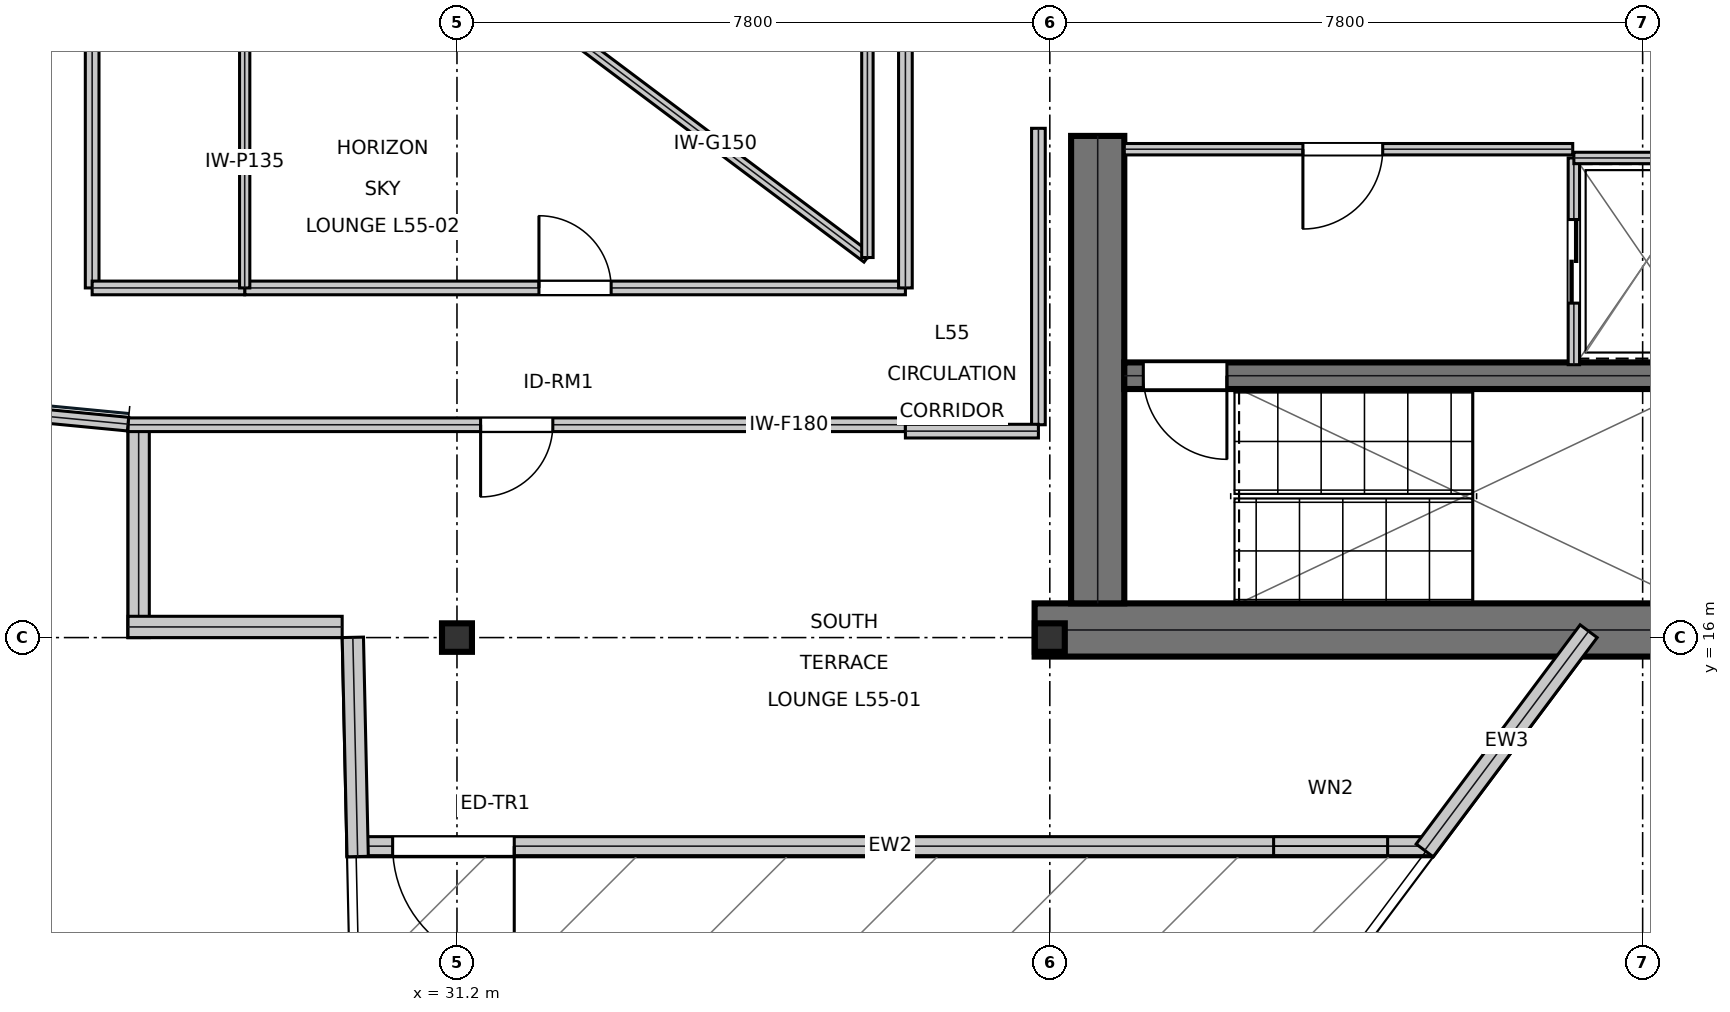
"""IFC4 building model, lengths in metres.
Left out: names, types, materials, properties, quantities, classifications, styles, units other than length and angle.
Written with IfcOpenShell. Run it as: python <this file> out.ifc"""

import sys

from ifc_helpers import new_model, si_unit, direction, frame, frame_2d, origin, origin_2d, place, context, subcontext, project, spatial, rectangle, i_section, extrude, element, fill, save


model = new_model("IFC4")
c1 = context("Model", 3, precision=1e-05, world=origin(), true_north=direction((0.0, 1.0)))
c2 = subcontext(c1, "Body", "Model", "MODEL_VIEW")
j1 = project(units=[si_unit("LENGTHUNIT", "METRE"), si_unit("PLANEANGLEUNIT", "RADIAN")], contexts=[c1])
p1 = place(None, origin())
s1 = spatial("IfcSite", under=j1, at=p1, CompositionType="ELEMENT")
p2 = place(p1, origin())
s2 = spatial("IfcBuilding", under=s1, at=p2, CompositionType="ELEMENT")
p3 = place(p2, frame((0.0, 0.0, 236.4)))
s3 = spatial("IfcBuildingStorey", under=s2, at=p3, CompositionType="ELEMENT", Elevation=236.4)
p4 = place(p3, frame((38.8, 16.1, 0.0), z_axis=(0.0, 0.0, 1.0), x_axis=(1.0, 0.0, 0.0)))
e1 = element("IfcWall", 1, at=p4, inside=s3, PredefinedType="SHEAR", context=c2, shape_type="SweptSolid", body=[
    extrude(rectangle(XDim=16.0, YDim=0.7, at=frame_2d((8.0, 0.0))), origin(), (0.0, 0.0, 1.0), 3.79),
])
p5 = place(p3, frame((39.63, 16.45, 0.0), z_axis=(0.0, 0.0, 1.0), x_axis=(0.0, 1.0, 0.0)))
e2 = element("IfcWall", 2, at=p5, inside=s3, PredefinedType="SHEAR", context=c2, shape_type="SweptSolid", body=[
    extrude(rectangle(XDim=6.15, YDim=0.7, at=frame_2d((3.075, 0.0))), origin(), (0.0, 0.0, 1.0), 3.79),
])
p6 = place(p3, frame((39.98, 19.445, 0.0), z_axis=(0.0, 0.0, 1.0), x_axis=(1.0, 0.0, 0.0)))
e3 = element("IfcWall", 3, at=p6, inside=s3, PredefinedType="SHEAR", context=c2, shape_type="SweptSolid", body=[
    extrude(rectangle(XDim=7.71, YDim=0.35, at=frame_2d((3.855, 0.0))), origin(), (0.0, 0.0, 1.0), 3.79),
])
p7 = place(p6, frame((0.25, 0.0, 0.0)))
e4 = element("IfcOpeningElement", 4, at=p7, cuts=e3, PredefinedType="OPENING", context=c2, shape_type="SweptSolid", body=[
    extrude(rectangle(XDim=1.1, YDim=2.15, at=frame_2d((0.55, 1.075))), frame((0.0, 0.185, 0.0), z_axis=(0.0, -1.0, 0.0), x_axis=(1.0, 0.0, 0.0)), (0.0, 0.0, 1.0), 0.37),
])
for number, where, z_axis, x_axis in (
    (5, (31.2, 16.0, 0.0), (0.0, 0.0, 1.0), (1.0, 0.0, 0.0)),
    (6, (39.0, 16.0, 0.0), (0.0, 0.0, 1.0), (1.0, 0.0, 0.0)),
):
    element("IfcColumn", number, at=place(p3, frame(where, z_axis=z_axis, x_axis=x_axis)), inside=s3, PredefinedType="COLUMN", context=c2, shape_type="SweptSolid", body=[
        extrude(i_section(OverallWidth=0.394, OverallDepth=0.375, WebThickness=0.017, FlangeThickness=0.028, at=origin_2d()), origin(), (0.0, 0.0, 1.0), 4.044),
    ])
p8 = place(p3, frame((29.754, 13.256, 0.0), z_axis=(0.0, 0.0, 1.0), x_axis=(1.0, 0.0, 0.0)))
e7 = element("IfcWall", 7, at=p8, inside=s3, PredefinedType="STANDARD", context=c2, shape_type="SweptSolid", body=[
    extrude(rectangle(XDim=14.291, YDim=0.25, at=frame_2d((7.145, 0.0))), origin(), (0.0, 0.0, 1.0), 3.241),
])
p9 = place(p8, frame((0.6, 0.0, 0.0)))
e8 = element("IfcOpeningElement", 8, at=p9, cuts=e7, PredefinedType="OPENING", context=c2, shape_type="SweptSolid", body=[
    extrude(rectangle(XDim=1.6, YDim=2.2, at=frame_2d((0.8, 1.1))), frame((0.0, 0.135, 0.0), z_axis=(0.0, -1.0, 0.0), x_axis=(1.0, 0.0, 0.0)), (0.0, 0.0, 1.0), 0.27),
])
p10 = place(p8, frame((12.191, 0.0, 0.95)))
e9 = element("IfcOpeningElement", 9, at=p10, cuts=e7, PredefinedType="OPENING", context=c2, shape_type="SweptSolid", body=[
    extrude(rectangle(XDim=1.5, YDim=1.6, at=frame_2d((0.75, 0.8))), frame((0.0, 0.135, 0.0), z_axis=(0.0, -1.0, 0.0), x_axis=(1.0, 0.0, 0.0)), (0.0, 0.0, 1.0), 0.27),
])
p11 = place(p3, frame((43.932, 13.2, 0.0), z_axis=(0.0, 0.0, 1.0), x_axis=(0.599012599487, 0.800739599156, 0.0)))
e10 = element("IfcWall", 10, at=p11, inside=s3, PredefinedType="STANDARD", context=c2, shape_type="SweptSolid", body=[
    extrude(rectangle(XDim=3.602, YDim=0.28, at=frame_2d((1.801, 0.0))), origin(), (0.0, 0.0, 1.0), 3.319),
])
p12 = place(p3, frame((27.012, 18.808, 0.0), z_axis=(0.0, 0.0, 1.0), x_axis=(0.0, -1.0, 0.0)))
e11 = element("IfcWall", 11, at=p12, inside=s3, PredefinedType="STANDARD", context=c2, shape_type="SweptSolid", body=[
    extrude(rectangle(XDim=2.808, YDim=0.28, at=frame_2d((1.404, 0.0))), origin(), (0.0, 0.0, 1.0), 3.319),
])
p13 = place(p3, frame((26.872, 16.14, 0.0), z_axis=(0.0, 0.0, 1.0), x_axis=(1.0, 0.0, 0.0)))
e12 = element("IfcWall", 12, at=p13, inside=s3, PredefinedType="STANDARD", context=c2, shape_type="SweptSolid", body=[
    extrude(rectangle(XDim=2.818, YDim=0.28, at=frame_2d((1.409, 0.0))), origin(), (0.0, 0.0, 1.0), 3.79),
])
p14 = place(p3, frame((29.83, 16.003, 0.0), z_axis=(0.0, 0.0, 1.0), x_axis=(0.022173502419, -0.999754137671, 0.0)))
e13 = element("IfcWall", 13, at=p14, inside=s3, PredefinedType="STANDARD", context=c2, shape_type="SweptSolid", body=[
    extrude(rectangle(XDim=2.885, YDim=0.28, at=frame_2d((1.442, 0.0))), origin(), (0.0, 0.0, 1.0), 3.79),
])
p15 = place(p3, frame((39.98, 22.425, 0.0), z_axis=(0.0, 0.0, 1.0), x_axis=(1.0, 0.0, 0.0)))
e14 = element("IfcWall", 14, at=p15, inside=s3, PredefinedType="PARTITIONING", context=c2, shape_type="SweptSolid", body=[
    extrude(rectangle(XDim=5.9, YDim=0.15, at=frame_2d((2.95, 0.0))), origin(), (0.0, 0.0, 1.0), 3.79),
])
p16 = place(p15, frame((2.35, 0.0, 0.0)))
e15 = element("IfcOpeningElement", 15, at=p16, cuts=e14, PredefinedType="OPENING", context=c2, shape_type="SweptSolid", body=[
    extrude(rectangle(XDim=1.05, YDim=2.15, at=frame_2d((0.525, 1.075))), frame((0.0, 0.085, 0.0), z_axis=(0.0, -1.0, 0.0), x_axis=(1.0, 0.0, 0.0)), (0.0, 0.0, 1.0), 0.17),
])
p17 = place(p3, frame((45.895, 19.59, 0.0), z_axis=(0.0, 0.0, 1.0), x_axis=(0.0, 1.0, 0.0)))
e16 = element("IfcWall", 16, at=p17, inside=s3, PredefinedType="PARTITIONING", context=c2, shape_type="SweptSolid", body=[
    extrude(rectangle(XDim=2.72, YDim=0.15, at=frame_2d((1.36, 0.0))), origin(), (0.0, 0.0, 1.0), 3.79),
])
p18 = place(p17, frame((0.81, 0.0, 0.0)))
e17 = element("IfcOpeningElement", 17, at=p18, cuts=e16, PredefinedType="OPENING", context=c2, shape_type="SweptSolid", body=[
    extrude(rectangle(XDim=1.1, YDim=2.15, at=frame_2d((0.55, 1.075))), frame((0.0, 0.085, 0.0), z_axis=(0.0, -1.0, 0.0), x_axis=(1.0, 0.0, 0.0)), (0.0, 0.0, 1.0), 0.17),
])
p19 = place(p3, frame((45.895, 22.31, 0.0), z_axis=(0.0, 0.0, 1.0), x_axis=(1.0, 0.0, 0.0)))
e18 = element("IfcWall", 18, at=p19, inside=s3, PredefinedType="PARTITIONING", context=c2, shape_type="SweptSolid", body=[
    extrude(rectangle(XDim=1.915, YDim=0.15, at=frame_2d((0.958, 0.0))), origin(), (0.0, 0.0, 1.0), 3.79),
])
p20 = place(p3, frame((26.872, 18.8, 0.0), z_axis=(0.0, 0.0, 1.0), x_axis=(1.0, 0.0, 0.0)))
e19 = element("IfcWall", 19, at=p20, inside=s3, PredefinedType="SOLIDWALL", context=c2, shape_type="SweptSolid", body=[
    extrude(rectangle(XDim=10.228, YDim=0.18, at=frame_2d((5.114, 0.0))), origin(), (0.0, 0.0, 1.0), 3.241),
])
p21 = place(p20, frame((4.639, 0.0, 0.0)))
e20 = element("IfcOpeningElement", 20, at=p21, cuts=e19, PredefinedType="OPENING", context=c2, shape_type="SweptSolid", body=[
    extrude(rectangle(XDim=0.95, YDim=2.15, at=frame_2d((0.475, 1.075))), frame((0.0, 0.1, 0.0), z_axis=(0.0, -1.0, 0.0), x_axis=(1.0, 0.0, 0.0)), (0.0, 0.0, 1.0), 0.2),
])
p22 = place(p3, frame((28.407, 20.6, 0.0), z_axis=(0.0, 0.0, 1.0), x_axis=(1.0, 0.0, 0.0)))
e21 = element("IfcWall", 21, at=p22, inside=s3, PredefinedType="SOLIDWALL", context=c2, shape_type="SweptSolid", body=[
    extrude(rectangle(XDim=8.693, YDim=0.18, at=frame_2d((4.347, 0.0))), origin(), (0.0, 0.0, 1.0), 3.241),
])
p23 = place(p22, frame((3.872, 0.0, 0.0)))
e22 = element("IfcOpeningElement", 22, at=p23, cuts=e21, PredefinedType="OPENING", context=c2, shape_type="SweptSolid", body=[
    extrude(rectangle(XDim=0.95, YDim=2.15, at=frame_2d((0.475, 1.075))), frame((0.0, 0.1, 0.0), z_axis=(0.0, -1.0, 0.0), x_axis=(1.0, 0.0, 0.0)), (0.0, 0.0, 1.0), 0.2),
])
p24 = place(p3, frame((38.85, 18.8, 0.0), z_axis=(0.0, 0.0, 1.0), x_axis=(0.0, 1.0, 0.0)))
e23 = element("IfcWall", 23, at=p24, inside=s3, PredefinedType="SOLIDWALL", context=c2, shape_type="SweptSolid", body=[
    extrude(rectangle(XDim=3.9, YDim=0.18, at=frame_2d((1.95, 0.0))), origin(), (0.0, 0.0, 1.0), 3.468),
])
p25 = place(p3, frame((37.1, 18.716, 0.0), z_axis=(0.0, 0.0, 1.0), x_axis=(1.0, 0.0, 0.0)))
e24 = element("IfcWall", 24, at=p25, inside=s3, PredefinedType="SOLIDWALL", context=c2, shape_type="SweptSolid", body=[
    extrude(rectangle(XDim=1.75, YDim=0.18, at=frame_2d((0.875, 0.0))), origin(), (0.0, 0.0, 1.0), 3.79),
])
p26 = place(p3, frame((37.1, 20.6, 0.0), z_axis=(0.0, 0.0, 1.0), x_axis=(0.0, 1.0, 0.0)))
e25 = element("IfcWall", 25, at=p26, inside=s3, PredefinedType="SOLIDWALL", context=c2, shape_type="SweptSolid", body=[
    extrude(rectangle(XDim=3.303, YDim=0.18, at=frame_2d((1.651, 0.0))), origin(), (0.0, 0.0, 1.0), 3.79),
])
p27 = place(p3, frame((26.4, 20.6, 0.0), z_axis=(0.0, 0.0, 1.0), x_axis=(0.0, 1.0, 0.0)))
e26 = element("IfcWall", 26, at=p27, inside=s3, PredefinedType="SOLIDWALL", context=c2, shape_type="SweptSolid", body=[
    extrude(rectangle(XDim=8.547, YDim=0.18, at=frame_2d((4.273, 0.0))), origin(), (0.0, 0.0, 1.0), 3.241),
])
p28 = place(p3, frame((24.6, 19.026, 0.0), z_axis=(0.0, 0.0, 1.0), x_axis=(0.995437598075, -0.095414822425, 0.0)))
e27 = element("IfcWall", 27, at=p28, inside=s3, PredefinedType="SOLIDWALL", context=c2, shape_type="SweptSolid", body=[
    extrude(rectangle(XDim=2.282, YDim=0.18, at=frame_2d((1.141, 0.0))), origin(), (0.0, 0.0, 1.0), 3.79),
])
p29 = place(p3, frame((26.4, 20.6, 0.0), z_axis=(0.0, 0.0, 1.0), x_axis=(1.0, 0.0, 0.0)))
e28 = element("IfcWall", 28, at=p29, inside=s3, PredefinedType="SOLIDWALL", context=c2, shape_type="SweptSolid", body=[
    extrude(rectangle(XDim=2.007, YDim=0.18, at=frame_2d((1.003, 0.0))), origin(), (0.0, 0.0, 1.0), 3.79),
])
p30 = place(p3, frame((28.407, 20.6, 0.0), z_axis=(0.0, 0.0, 1.0), x_axis=(0.0, 1.0, 0.0)))
e29 = element("IfcWall", 29, at=p30, inside=s3, PredefinedType="PARTITIONING", context=c2, shape_type="SweptSolid", body=[
    extrude(rectangle(XDim=3.303, YDim=0.135, at=frame_2d((1.651, 0.0))), origin(), (0.0, 0.0, 1.0), 3.241),
])
p31 = place(p3, frame((32.6, 24.0, 0.0), z_axis=(0.0, 0.0, 1.0), x_axis=(0.8, -0.6, 0.0)))
e30 = element("IfcWall", 30, at=p31, inside=s3, PredefinedType="MOVABLE", context=c2, shape_type="SweptSolid", body=[
    extrude(rectangle(XDim=5.0, YDim=0.15, at=frame_2d((2.5, 0.0))), origin(), (0.0, 0.0, 1.0), 3.79),
])
p32 = place(p3, frame((36.6, 21.0, 0.0), z_axis=(0.0, 0.0, 1.0), x_axis=(0.0, 1.0, 0.0)))
e31 = element("IfcWall", 31, at=p32, inside=s3, PredefinedType="MOVABLE", context=c2, shape_type="SweptSolid", body=[
    extrude(rectangle(XDim=6.0, YDim=0.15, at=frame_2d((3.0, 0.0))), origin(), (0.0, 0.0, 1.0), 3.79),
])
p33 = place(p9, frame((1.6, 0.0, 0.0), z_axis=(0.0, 0.0, 1.0), x_axis=(-1.0, 0.0, 0.0)))
e32 = element("IfcDoor", 32, at=p33, inside=s3, OperationType="SINGLE_SWING_LEFT", PredefinedType="DOOR", context=c2, shape_type="SweptSolid", body=[
    extrude(rectangle(XDim=1.6, YDim=2.2, at=frame_2d((0.8, 1.1))), frame((0.0, 0.025, 0.0), z_axis=(0.0, -1.0, 0.0), x_axis=(1.0, 0.0, 0.0)), (0.0, 0.0, 1.0), 0.05),
])
fill(e8, e32)
p34 = place(p10, origin())
e33 = element("IfcWindow", 33, at=p34, inside=s3, PartitioningType="SINGLE_PANEL", PredefinedType="WINDOW", context=c2, shape_type="SweptSolid", body=[
    extrude(rectangle(XDim=1.5, YDim=1.6, at=frame_2d((0.75, 0.8))), frame((0.0, 0.03, 0.0), z_axis=(0.0, -1.0, 0.0), x_axis=(1.0, 0.0, 0.0)), (0.0, 0.0, 1.0), 0.06),
])
fill(e9, e33)
p35 = place(p16, frame((1.05, 0.0, 0.0), z_axis=(0.0, 0.0, 1.0), x_axis=(-1.0, 0.0, 0.0)))
e34 = element("IfcDoor", 34, at=p35, inside=s3, OperationType="SINGLE_SWING_RIGHT", PredefinedType="DOOR", context=c2, shape_type="SweptSolid", body=[
    extrude(rectangle(XDim=1.05, YDim=2.15, at=frame_2d((0.525, 1.075))), frame((0.0, 0.025, 0.0), z_axis=(0.0, -1.0, 0.0), x_axis=(1.0, 0.0, 0.0)), (0.0, 0.0, 1.0), 0.05),
])
fill(e15, e34)
p36 = place(p18, frame((1.1, 0.0, 0.0), z_axis=(0.0, 0.0, 1.0), x_axis=(-1.0, 0.0, 0.0)))
e35 = element("IfcDoor", 35, at=p36, inside=s3, OperationType="DOUBLE_DOOR_SLIDING", PredefinedType="DOOR", context=c2, shape_type="SweptSolid", body=[
    extrude(rectangle(XDim=1.1, YDim=2.15, at=frame_2d((0.55, 1.075))), frame((0.0, 0.025, 0.0), z_axis=(0.0, -1.0, 0.0), x_axis=(1.0, 0.0, 0.0)), (0.0, 0.0, 1.0), 0.05),
])
fill(e17, e35)
p37 = place(p21, frame((0.95, 0.0, 0.0), z_axis=(0.0, 0.0, 1.0), x_axis=(-1.0, 0.0, 0.0)))
e36 = element("IfcDoor", 36, at=p37, inside=s3, OperationType="SINGLE_SWING_RIGHT", PredefinedType="DOOR", context=c2, shape_type="SweptSolid", body=[
    extrude(rectangle(XDim=0.95, YDim=2.15, at=frame_2d((0.475, 1.075))), frame((0.0, 0.025, 0.0), z_axis=(0.0, -1.0, 0.0), x_axis=(1.0, 0.0, 0.0)), (0.0, 0.0, 1.0), 0.05),
])
fill(e20, e36)
p38 = place(p23, origin())
e37 = element("IfcDoor", 37, at=p38, inside=s3, OperationType="SINGLE_SWING_LEFT", PredefinedType="DOOR", context=c2, shape_type="SweptSolid", body=[
    extrude(rectangle(XDim=0.95, YDim=2.15, at=frame_2d((0.475, 1.075))), frame((0.0, 0.025, 0.0), z_axis=(0.0, -1.0, 0.0), x_axis=(1.0, 0.0, 0.0)), (0.0, 0.0, 1.0), 0.05),
])
fill(e22, e37)
p39 = place(p7, frame((1.1, 0.0, 0.0), z_axis=(0.0, 0.0, 1.0), x_axis=(-1.0, 0.0, 0.0)))
e38 = element("IfcDoor", 38, at=p39, inside=s3, OperationType="SINGLE_SWING_LEFT", PredefinedType="DOOR", context=c2, shape_type="SweptSolid", body=[
    extrude(rectangle(XDim=1.1, YDim=2.15, at=frame_2d((0.55, 1.075))), frame((0.0, 0.025, 0.0), z_axis=(0.0, -1.0, 0.0), x_axis=(1.0, 0.0, 0.0)), (0.0, 0.0, 1.0), 0.05),
])
fill(e4, e38)
save(model, sys.argv[1])
